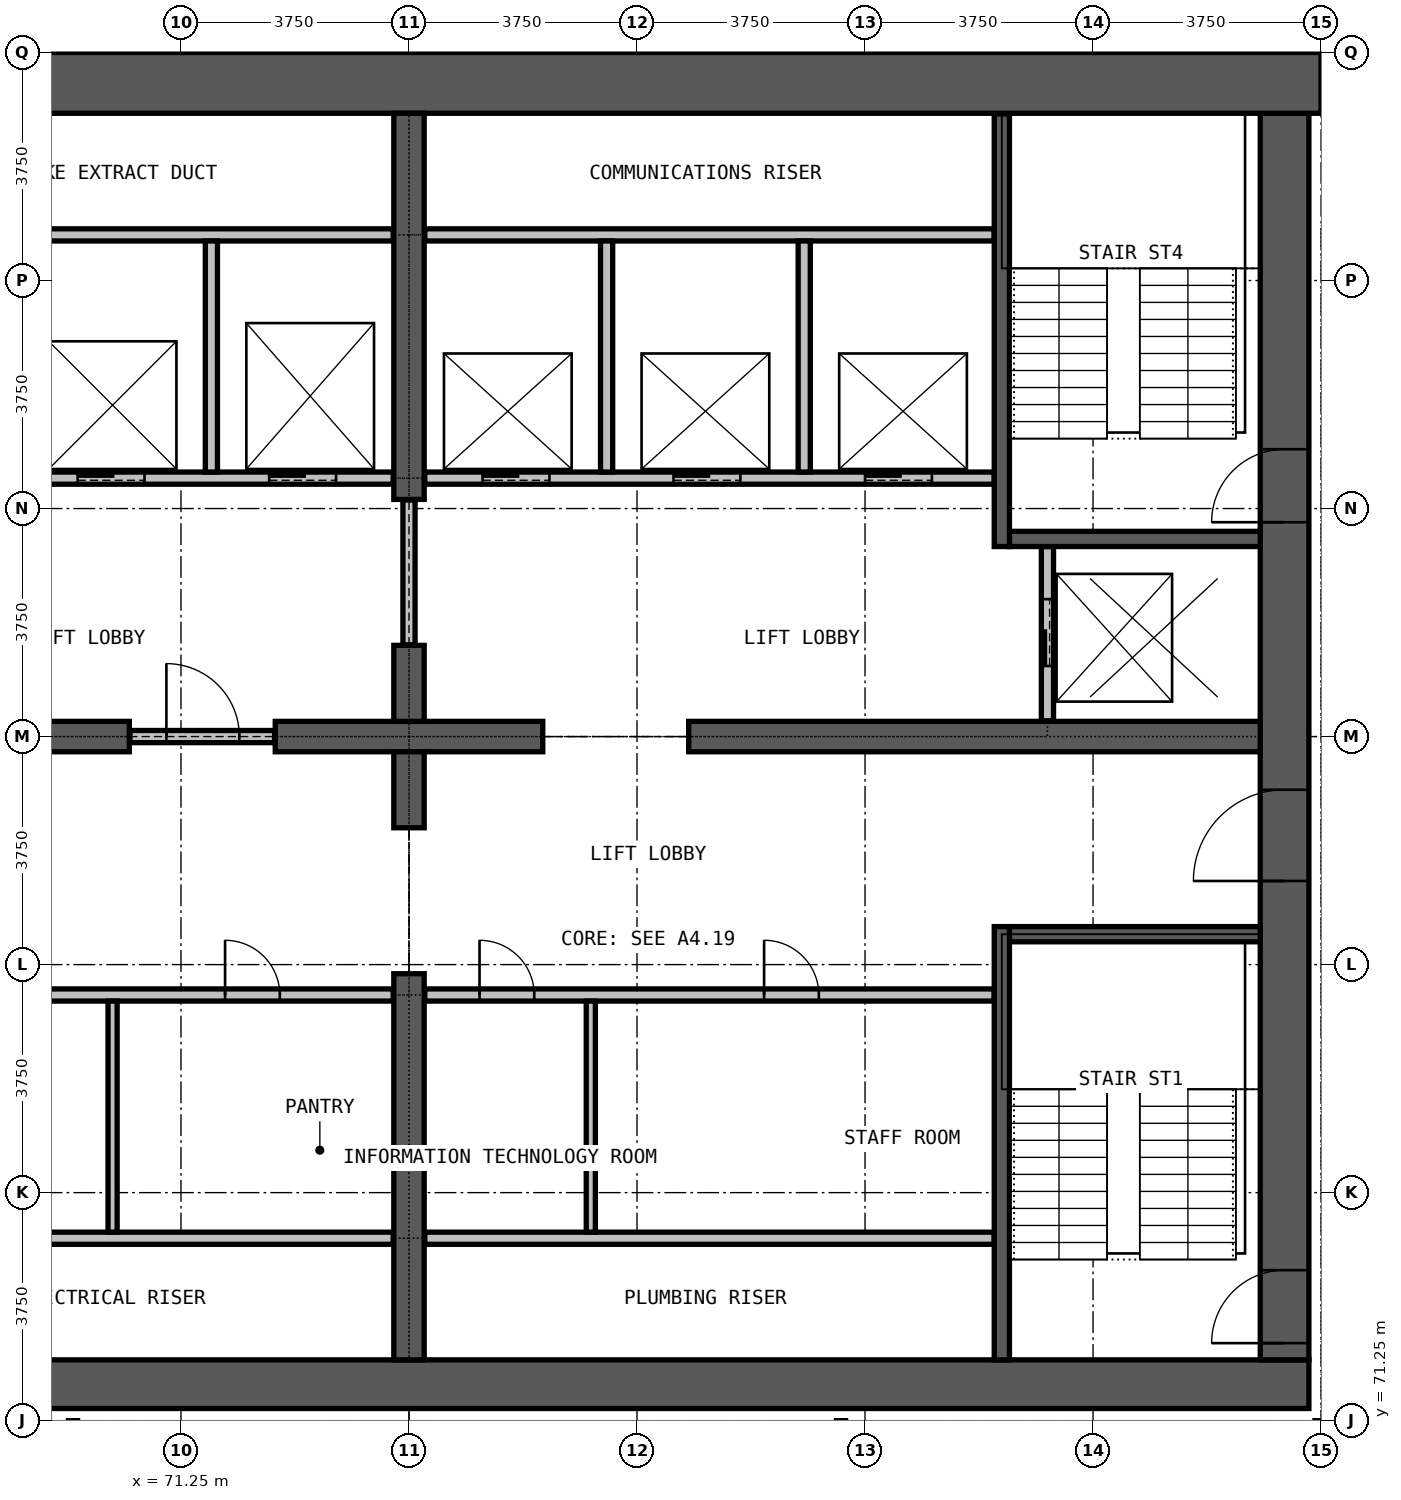
"""IFC4 building model, lengths in metres.
Left out: names, types, materials, properties, quantities, classifications, styles, units other than length and angle.
Written with IfcOpenShell. Run it as: python <this file> out.ifc"""

import sys

from ifc_helpers import new_model, si_unit, direction, frame, frame_2d, origin, place, context, subcontext, project, spatial, rectangle, extrude, element, fill, save


model = new_model("IFC4")
c1 = context("Model", 3, precision=1e-05, world=origin(), true_north=direction((0.0, 1.0)))
c2 = subcontext(c1, "Body", "Model", "MODEL_VIEW")
j1 = project(units=[si_unit("LENGTHUNIT", "METRE"), si_unit("PLANEANGLEUNIT", "RADIAN")], contexts=[c1])
p1 = place(None, origin())
s1 = spatial("IfcSite", under=j1, at=p1, CompositionType="ELEMENT")
p2 = place(p1, origin())
s2 = spatial("IfcBuilding", under=s1, at=p2, CompositionType="ELEMENT")
p3 = place(p2, frame((0.0, 0.0, 180.1)))
s3 = spatial("IfcBuildingStorey", under=s2, at=p3, CompositionType="ELEMENT", Elevation=180.1)
p4 = place(p3, frame((60.2, 71.85, 0.0), z_axis=(0.0, 0.0, 1.0), x_axis=(1.0, 0.0, 0.0)))
e1 = element("IfcWall", 1, at=p4, inside=s3, PredefinedType="SHEAR", context=c2, shape_type="SweptSolid", body=[
    extrude(rectangle(XDim=29.6, YDim=0.8, at=frame_2d((14.8, 0.0))), origin(), (0.0, 0.0, 1.0), 3.6),
])
p5 = place(p3, frame((89.4, 72.25, 0.0), z_axis=(0.0, 0.0, 1.0), x_axis=(0.0, 1.0, 0.0)))
e2 = element("IfcWall", 2, at=p5, inside=s3, PredefinedType="SHEAR", context=c2, shape_type="SweptSolid", body=[
    extrude(rectangle(XDim=20.5, YDim=0.8, at=frame_2d((10.25, 0.0))), origin(), (0.0, 0.0, 1.0), 3.6),
])
p6 = place(p5, frame((0.275, 0.0, 0.0)))
e3 = element("IfcOpeningElement", 3, at=p6, cuts=e2, PredefinedType="OPENING", context=c2, shape_type="SweptSolid", body=[
    extrude(rectangle(XDim=1.2, YDim=2.2, at=frame_2d((0.6, 1.1))), frame((0.0, 0.41, 0.0), z_axis=(0.0, -1.0, 0.0), x_axis=(1.0, 0.0, 0.0)), (0.0, 0.0, 1.0), 0.82),
])
p7 = place(p5, frame((13.775, 0.0, 0.0)))
e4 = element("IfcOpeningElement", 4, at=p7, cuts=e2, PredefinedType="OPENING", context=c2, shape_type="SweptSolid", body=[
    extrude(rectangle(XDim=1.2, YDim=2.2, at=frame_2d((0.6, 1.1))), frame((0.0, 0.41, 0.0), z_axis=(0.0, -1.0, 0.0), x_axis=(1.0, 0.0, 0.0)), (0.0, 0.0, 1.0), 0.82),
])
p8 = place(p5, frame((7.875, 0.0, 0.0)))
e5 = element("IfcOpeningElement", 5, at=p8, cuts=e2, PredefinedType="OPENING", context=c2, shape_type="SweptSolid", body=[
    extrude(rectangle(XDim=1.5, YDim=2.2, at=frame_2d((0.75, 1.1))), frame((0.0, 0.41, 0.0), z_axis=(0.0, -1.0, 0.0), x_axis=(1.0, 0.0, 0.0)), (0.0, 0.0, 1.0), 0.82),
])
p9 = place(p3, frame((90.0, 93.25, 0.0), z_axis=(0.0, 0.0, 1.0), x_axis=(-1.0, 0.0, 0.0)))
e6 = element("IfcWall", 6, at=p9, inside=s3, PredefinedType="SHEAR", context=c2, shape_type="SweptSolid", body=[
    extrude(rectangle(XDim=30.0, YDim=1.0, at=frame_2d((15.0, 0.0))), origin(), (0.0, 0.0, 1.0), 3.6),
])
p10 = place(p3, frame((61.0, 82.5, 0.0), z_axis=(0.0, 0.0, 1.0), x_axis=(1.0, 0.0, 0.0)))
e7 = element("IfcWall", 7, at=p10, inside=s3, PredefinedType="SHEAR", context=c2, shape_type="SweptSolid", body=[
    extrude(rectangle(XDim=9.4, YDim=0.5, at=frame_2d((4.7, 0.0))), origin(), (0.0, 0.0, 1.0), 3.6),
])
p11 = place(p3, frame((72.8, 82.5, 0.0), z_axis=(0.0, 0.0, 1.0), x_axis=(1.0, 0.0, 0.0)))
e8 = element("IfcWall", 8, at=p11, inside=s3, PredefinedType="SHEAR", context=c2, shape_type="SweptSolid", body=[
    extrude(rectangle(XDim=4.4, YDim=0.5, at=frame_2d((2.2, 0.0))), origin(), (0.0, 0.0, 1.0), 3.6),
])
p12 = place(p3, frame((79.6, 82.5, 0.0), z_axis=(0.0, 0.0, 1.0), x_axis=(1.0, 0.0, 0.0)))
e9 = element("IfcWall", 9, at=p12, inside=s3, PredefinedType="SHEAR", context=c2, shape_type="SweptSolid", body=[
    extrude(rectangle(XDim=9.4, YDim=0.5, at=frame_2d((4.7, 0.0))), origin(), (0.0, 0.0, 1.0), 3.6),
])
p13 = place(p3, frame((75.0, 72.25, 0.0), z_axis=(0.0, 0.0, 1.0), x_axis=(0.0, 1.0, 0.0)))
e10 = element("IfcWall", 10, at=p13, inside=s3, PredefinedType="SHEAR", context=c2, shape_type="SweptSolid", body=[
    extrude(rectangle(XDim=6.35, YDim=0.5, at=frame_2d((3.175, 0.0))), origin(), (0.0, 0.0, 1.0), 3.6),
])
for number, where, z_axis, x_axis in (
    (11, (75.0, 81.0, 0.0), (0.0, 0.0, 1.0), (0.0, 1.0, 0.0)),
    (12, (75.0, 82.75, 0.0), (0.0, 0.0, 1.0), (0.0, 1.0, 0.0)),
):
    element("IfcWall", number, at=place(p3, frame(where, z_axis=z_axis, x_axis=x_axis)), inside=s3, PredefinedType="SHEAR", context=c2, shape_type="SweptSolid", body=[
        extrude(rectangle(XDim=1.25, YDim=0.5, at=frame_2d((0.625, 0.0))), origin(), (0.0, 0.0, 1.0), 3.6),
    ])
p14 = place(p3, frame((75.0, 86.4, 0.0), z_axis=(0.0, 0.0, 1.0), x_axis=(0.0, 1.0, 0.0)))
e13 = element("IfcWall", 13, at=p14, inside=s3, PredefinedType="SHEAR", context=c2, shape_type="SweptSolid", body=[
    extrude(rectangle(XDim=6.35, YDim=0.5, at=frame_2d((3.175, 0.0))), origin(), (0.0, 0.0, 1.0), 3.6),
])
for number, where, z_axis, x_axis in (
    (14, (65.375, 74.25, 0.0), (0.0, 0.0, 1.0), (1.0, 0.0, 0.0)),
    (15, (75.26, 74.25, 0.0), (0.0, 0.0, 1.0), (1.0, 0.0, 0.0)),
):
    element("IfcWall", number, at=place(p3, frame(where, z_axis=z_axis, x_axis=x_axis)), inside=s3, PredefinedType="PARTITIONING", context=c2, shape_type="SweptSolid", body=[
        extrude(rectangle(XDim=9.365, YDim=0.2, at=frame_2d((4.683, 0.0))), origin(), (0.0, 0.0, 1.0), 3.25),
    ])
p15 = place(p3, frame((65.375, 78.25, 0.0), z_axis=(0.0, 0.0, 1.0), x_axis=(1.0, 0.0, 0.0)))
e16 = element("IfcWall", 16, at=p15, inside=s3, PredefinedType="PARTITIONING", context=c2, shape_type="SweptSolid", body=[
    extrude(rectangle(XDim=9.365, YDim=0.2, at=frame_2d((4.683, 0.0))), origin(), (0.0, 0.0, 1.0), 3.25),
])
p16 = place(p15, frame((1.9, 0.0, 0.0)))
e17 = element("IfcOpeningElement", 17, at=p16, cuts=e16, PredefinedType="OPENING", context=c2, shape_type="SweptSolid", body=[
    extrude(rectangle(XDim=0.9, YDim=2.2, at=frame_2d((0.45, 1.1))), frame((0.0, 0.11, 0.0), z_axis=(0.0, -1.0, 0.0), x_axis=(1.0, 0.0, 0.0)), (0.0, 0.0, 1.0), 0.22),
])
p17 = place(p15, frame((6.6, 0.0, 0.0)))
e18 = element("IfcOpeningElement", 18, at=p17, cuts=e16, PredefinedType="OPENING", context=c2, shape_type="SweptSolid", body=[
    extrude(rectangle(XDim=0.9, YDim=2.2, at=frame_2d((0.45, 1.1))), frame((0.0, 0.11, 0.0), z_axis=(0.0, -1.0, 0.0), x_axis=(1.0, 0.0, 0.0)), (0.0, 0.0, 1.0), 0.22),
])
p18 = place(p3, frame((75.26, 78.25, 0.0), z_axis=(0.0, 0.0, 1.0), x_axis=(1.0, 0.0, 0.0)))
e19 = element("IfcWall", 19, at=p18, inside=s3, PredefinedType="PARTITIONING", context=c2, shape_type="SweptSolid", body=[
    extrude(rectangle(XDim=9.365, YDim=0.2, at=frame_2d((4.683, 0.0))), origin(), (0.0, 0.0, 1.0), 3.25),
])
p19 = place(p18, frame((0.9, 0.0, 0.0)))
e20 = element("IfcOpeningElement", 20, at=p19, cuts=e19, PredefinedType="OPENING", context=c2, shape_type="SweptSolid", body=[
    extrude(rectangle(XDim=0.9, YDim=2.2, at=frame_2d((0.45, 1.1))), frame((0.0, 0.11, 0.0), z_axis=(0.0, -1.0, 0.0), x_axis=(1.0, 0.0, 0.0)), (0.0, 0.0, 1.0), 0.22),
])
p20 = place(p18, frame((5.58, 0.0, 0.0)))
e21 = element("IfcOpeningElement", 21, at=p20, cuts=e19, PredefinedType="OPENING", context=c2, shape_type="SweptSolid", body=[
    extrude(rectangle(XDim=0.9, YDim=2.2, at=frame_2d((0.45, 1.1))), frame((0.0, 0.11, 0.0), z_axis=(0.0, -1.0, 0.0), x_axis=(1.0, 0.0, 0.0)), (0.0, 0.0, 1.0), 0.22),
])
p21 = place(p3, frame((70.41, 82.5, 0.0), z_axis=(0.0, 0.0, 1.0), x_axis=(1.0, 0.0, 0.0)))
e22 = element("IfcWall", 22, at=p21, inside=s3, PredefinedType="PARTITIONING", context=c2, shape_type="SweptSolid", body=[
    extrude(rectangle(XDim=2.38, YDim=0.2, at=frame_2d((1.19, 0.0))), origin(), (0.0, 0.0, 1.0), 2.4),
])
p22 = place(p21, frame((0.6, 0.0, 0.0)))
e23 = element("IfcOpeningElement", 23, at=p22, cuts=e22, PredefinedType="OPENING", context=c2, shape_type="SweptSolid", body=[
    extrude(rectangle(XDim=1.2, YDim=2.2, at=frame_2d((0.6, 1.1))), frame((0.0, 0.11, 0.0), z_axis=(0.0, -1.0, 0.0), x_axis=(1.0, 0.0, 0.0)), (0.0, 0.0, 1.0), 0.22),
])
p23 = place(p3, frame((75.0, 84.01, 0.0), z_axis=(0.0, 0.0, 1.0), x_axis=(0.0, 1.0, 0.0)))
e24 = element("IfcWall", 24, at=p23, inside=s3, PredefinedType="PARTITIONING", context=c2, shape_type="SweptSolid", body=[
    extrude(rectangle(XDim=2.38, YDim=0.2, at=frame_2d((1.19, 0.0))), origin(), (0.0, 0.0, 1.0), 2.4),
])
for number, where, z_axis, x_axis in (
    (25, (70.125, 74.35, 0.0), (0.0, 0.0, 1.0), (0.0, 1.0, 0.0)),
    (26, (77.99, 74.35, 0.0), (0.0, 0.0, 1.0), (0.0, 1.0, 0.0)),
):
    element("IfcWall", number, at=place(p3, frame(where, z_axis=z_axis, x_axis=x_axis)), inside=s3, PredefinedType="PARTITIONING", context=c2, shape_type="SweptSolid", body=[
        extrude(rectangle(XDim=3.8, YDim=0.15, at=frame_2d((1.9, 0.0))), origin(), (0.0, 0.0, 1.0), 3.25),
    ])
p24 = place(p3, frame((65.375, 86.75, 0.0), z_axis=(0.0, 0.0, 1.0), x_axis=(1.0, 0.0, 0.0)))
e27 = element("IfcWall", 27, at=p24, inside=s3, PredefinedType="PARTITIONING", context=c2, shape_type="SweptSolid", body=[
    extrude(rectangle(XDim=9.365, YDim=0.2, at=frame_2d((4.683, 0.0))), origin(), (0.0, 0.0, 1.0), 3.25),
])
p25 = place(p24, frame((1.0, 0.0, 0.0)))
e28 = element("IfcOpeningElement", 28, at=p25, cuts=e27, PredefinedType="OPENING", context=c2, shape_type="SweptSolid", body=[
    extrude(rectangle(XDim=1.1, YDim=2.2, at=frame_2d((0.55, 1.1))), frame((0.0, 0.11, 0.0), z_axis=(0.0, -1.0, 0.0), x_axis=(1.0, 0.0, 0.0)), (0.0, 0.0, 1.0), 0.22),
])
p26 = place(p24, frame((4.175, 0.0, 0.0)))
e29 = element("IfcOpeningElement", 29, at=p26, cuts=e27, PredefinedType="OPENING", context=c2, shape_type="SweptSolid", body=[
    extrude(rectangle(XDim=1.1, YDim=2.2, at=frame_2d((0.55, 1.1))), frame((0.0, 0.11, 0.0), z_axis=(0.0, -1.0, 0.0), x_axis=(1.0, 0.0, 0.0)), (0.0, 0.0, 1.0), 0.22),
])
p27 = place(p24, frame((7.325, 0.0, 0.0)))
e30 = element("IfcOpeningElement", 30, at=p27, cuts=e27, PredefinedType="OPENING", context=c2, shape_type="SweptSolid", body=[
    extrude(rectangle(XDim=1.1, YDim=2.2, at=frame_2d((0.55, 1.1))), frame((0.0, 0.11, 0.0), z_axis=(0.0, -1.0, 0.0), x_axis=(1.0, 0.0, 0.0)), (0.0, 0.0, 1.0), 0.22),
])
p28 = place(p3, frame((75.26, 86.75, 0.0), z_axis=(0.0, 0.0, 1.0), x_axis=(1.0, 0.0, 0.0)))
e31 = element("IfcWall", 31, at=p28, inside=s3, PredefinedType="PARTITIONING", context=c2, shape_type="SweptSolid", body=[
    extrude(rectangle(XDim=9.365, YDim=0.2, at=frame_2d((4.683, 0.0))), origin(), (0.0, 0.0, 1.0), 3.25),
])
p29 = place(p28, frame((0.95, 0.0, 0.0)))
e32 = element("IfcOpeningElement", 32, at=p29, cuts=e31, PredefinedType="OPENING", context=c2, shape_type="SweptSolid", body=[
    extrude(rectangle(XDim=1.1, YDim=2.2, at=frame_2d((0.55, 1.1))), frame((0.0, 0.11, 0.0), z_axis=(0.0, -1.0, 0.0), x_axis=(1.0, 0.0, 0.0)), (0.0, 0.0, 1.0), 0.22),
])
p30 = place(p28, frame((4.09, 0.0, 0.0)))
e33 = element("IfcOpeningElement", 33, at=p30, cuts=e31, PredefinedType="OPENING", context=c2, shape_type="SweptSolid", body=[
    extrude(rectangle(XDim=1.1, YDim=2.2, at=frame_2d((0.55, 1.1))), frame((0.0, 0.11, 0.0), z_axis=(0.0, -1.0, 0.0), x_axis=(1.0, 0.0, 0.0)), (0.0, 0.0, 1.0), 0.22),
])
p31 = place(p28, frame((7.24, 0.0, 0.0)))
e34 = element("IfcOpeningElement", 34, at=p31, cuts=e31, PredefinedType="OPENING", context=c2, shape_type="SweptSolid", body=[
    extrude(rectangle(XDim=1.1, YDim=2.2, at=frame_2d((0.55, 1.1))), frame((0.0, 0.11, 0.0), z_axis=(0.0, -1.0, 0.0), x_axis=(1.0, 0.0, 0.0)), (0.0, 0.0, 1.0), 0.22),
])
for number, where, z_axis, x_axis in (
    (35, (65.375, 90.75, 0.0), (0.0, 0.0, 1.0), (1.0, 0.0, 0.0)),
    (36, (75.26, 90.75, 0.0), (0.0, 0.0, 1.0), (1.0, 0.0, 0.0)),
):
    element("IfcWall", number, at=place(p3, frame(where, z_axis=z_axis, x_axis=x_axis)), inside=s3, PredefinedType="PARTITIONING", context=c2, shape_type="SweptSolid", body=[
        extrude(rectangle(XDim=9.365, YDim=0.2, at=frame_2d((4.683, 0.0))), origin(), (0.0, 0.0, 1.0), 3.25),
    ])
for number, where, z_axis, x_axis in (
    (37, (71.75, 86.85, 0.0), (0.0, 0.0, 1.0), (0.0, 1.0, 0.0)),
    (38, (78.25, 86.85, 0.0), (0.0, 0.0, 1.0), (0.0, 1.0, 0.0)),
    (39, (81.5, 86.85, 0.0), (0.0, 0.0, 1.0), (0.0, 1.0, 0.0)),
):
    element("IfcWall", number, at=place(p3, frame(where, z_axis=z_axis, x_axis=x_axis)), inside=s3, PredefinedType="PARTITIONING", context=c2, shape_type="SweptSolid", body=[
        extrude(rectangle(XDim=3.8, YDim=0.2, at=frame_2d((1.9, 0.0))), origin(), (0.0, 0.0, 1.0), 3.25),
    ])
p32 = place(p3, frame((85.5, 82.76, 0.0), z_axis=(0.0, 0.0, 1.0), x_axis=(0.0, 1.0, 0.0)))
e40 = element("IfcWall", 40, at=p32, inside=s3, PredefinedType="PARTITIONING", context=c2, shape_type="SweptSolid", body=[
    extrude(rectangle(XDim=2.865, YDim=0.2, at=frame_2d((1.433, 0.0))), origin(), (0.0, 0.0, 1.0), 3.25),
])
p33 = place(p32, frame((0.9, 0.0, 0.0)))
e41 = element("IfcOpeningElement", 41, at=p33, cuts=e40, PredefinedType="OPENING", context=c2, shape_type="SweptSolid", body=[
    extrude(rectangle(XDim=1.1, YDim=2.2, at=frame_2d((0.55, 1.1))), frame((0.0, 0.11, 0.0), z_axis=(0.0, -1.0, 0.0), x_axis=(1.0, 0.0, 0.0)), (0.0, 0.0, 1.0), 0.22),
])
for number, where, z_axis, x_axis in (
    (42, (84.875, 79.25, 0.0), (0.0, 0.0, 1.0), (1.0, 0.0, 0.0)),
    (43, (84.875, 85.75, 0.0), (0.0, 0.0, 1.0), (1.0, 0.0, 0.0)),
):
    element("IfcWall", number, at=place(p3, frame(where, z_axis=z_axis, x_axis=x_axis)), inside=s3, PredefinedType="PARTITIONING", context=c2, shape_type="SweptSolid", body=[
        extrude(rectangle(XDim=4.125, YDim=0.25, at=frame_2d((2.062, 0.0))), origin(), (0.0, 0.0, 1.0), 3.25),
    ])
p34 = place(p3, frame((84.75, 72.25, 0.0), z_axis=(0.0, 0.0, 1.0), x_axis=(0.0, 1.0, 0.0)))
e44 = element("IfcWall", 44, at=p34, inside=s3, PredefinedType="PARTITIONING", context=c2, shape_type="SweptSolid", body=[
    extrude(rectangle(XDim=7.125, YDim=0.25, at=frame_2d((3.562, 0.0))), origin(), (0.0, 0.0, 1.0), 3.25),
])
p35 = place(p3, frame((84.75, 85.625, 0.0), z_axis=(0.0, 0.0, 1.0), x_axis=(0.0, 1.0, 0.0)))
e45 = element("IfcWall", 45, at=p35, inside=s3, PredefinedType="PARTITIONING", context=c2, shape_type="SweptSolid", body=[
    extrude(rectangle(XDim=7.115, YDim=0.25, at=frame_2d((3.558, 0.0))), origin(), (0.0, 0.0, 1.0), 3.25),
])
p36 = place(p29, origin())
e46 = element("IfcDoor", 46, at=p36, inside=s3, OperationType="DOUBLE_DOOR_SLIDING", PredefinedType="DOOR", context=c2, shape_type="SweptSolid", body=[
    extrude(rectangle(XDim=1.1, YDim=2.2, at=frame_2d((0.55, 1.1))), frame((0.0, 0.025, 0.0), z_axis=(0.0, -1.0, 0.0), x_axis=(1.0, 0.0, 0.0)), (0.0, 0.0, 1.0), 0.05),
])
fill(e32, e46)
p37 = place(p30, origin())
e47 = element("IfcDoor", 47, at=p37, inside=s3, OperationType="DOUBLE_DOOR_SLIDING", PredefinedType="DOOR", context=c2, shape_type="SweptSolid", body=[
    extrude(rectangle(XDim=1.1, YDim=2.2, at=frame_2d((0.55, 1.1))), frame((0.0, 0.025, 0.0), z_axis=(0.0, -1.0, 0.0), x_axis=(1.0, 0.0, 0.0)), (0.0, 0.0, 1.0), 0.05),
])
fill(e33, e47)
p38 = place(p31, origin())
e48 = element("IfcDoor", 48, at=p38, inside=s3, OperationType="DOUBLE_DOOR_SLIDING", PredefinedType="DOOR", context=c2, shape_type="SweptSolid", body=[
    extrude(rectangle(XDim=1.1, YDim=2.2, at=frame_2d((0.55, 1.1))), frame((0.0, 0.025, 0.0), z_axis=(0.0, -1.0, 0.0), x_axis=(1.0, 0.0, 0.0)), (0.0, 0.0, 1.0), 0.05),
])
fill(e34, e48)
p39 = place(p26, origin())
e49 = element("IfcDoor", 49, at=p39, inside=s3, OperationType="DOUBLE_DOOR_SLIDING", PredefinedType="DOOR", context=c2, shape_type="SweptSolid", body=[
    extrude(rectangle(XDim=1.1, YDim=2.2, at=frame_2d((0.55, 1.1))), frame((0.0, 0.025, 0.0), z_axis=(0.0, -1.0, 0.0), x_axis=(1.0, 0.0, 0.0)), (0.0, 0.0, 1.0), 0.05),
])
fill(e29, e49)
p40 = place(p27, origin())
e50 = element("IfcDoor", 50, at=p40, inside=s3, OperationType="DOUBLE_DOOR_SLIDING", PredefinedType="DOOR", context=c2, shape_type="SweptSolid", body=[
    extrude(rectangle(XDim=1.1, YDim=2.2, at=frame_2d((0.55, 1.1))), frame((0.0, 0.025, 0.0), z_axis=(0.0, -1.0, 0.0), x_axis=(1.0, 0.0, 0.0)), (0.0, 0.0, 1.0), 0.05),
])
fill(e30, e50)
p41 = place(p33, origin())
e51 = element("IfcDoor", 51, at=p41, inside=s3, OperationType="DOUBLE_DOOR_SLIDING", PredefinedType="DOOR", context=c2, shape_type="SweptSolid", body=[
    extrude(rectangle(XDim=1.1, YDim=2.2, at=frame_2d((0.55, 1.1))), frame((0.0, 0.025, 0.0), z_axis=(0.0, -1.0, 0.0), x_axis=(1.0, 0.0, 0.0)), (0.0, 0.0, 1.0), 0.05),
])
fill(e41, e51)
p42 = place(p22, origin())
e52 = element("IfcDoor", 52, at=p42, inside=s3, OperationType="SINGLE_SWING_LEFT", PredefinedType="DOOR", context=c2, shape_type="SweptSolid", body=[
    extrude(rectangle(XDim=1.2, YDim=2.2, at=frame_2d((0.6, 1.1))), frame((0.0, 0.025, 0.0), z_axis=(0.0, -1.0, 0.0), x_axis=(1.0, 0.0, 0.0)), (0.0, 0.0, 1.0), 0.05),
])
fill(e23, e52)
p43 = place(p6, origin())
e53 = element("IfcDoor", 53, at=p43, inside=s3, OperationType="SINGLE_SWING_RIGHT", PredefinedType="DOOR", context=c2, shape_type="SweptSolid", body=[
    extrude(rectangle(XDim=1.2, YDim=2.2, at=frame_2d((0.6, 1.1))), frame((0.0, 0.025, 0.0), z_axis=(0.0, -1.0, 0.0), x_axis=(1.0, 0.0, 0.0)), (0.0, 0.0, 1.0), 0.05),
])
fill(e3, e53)
p44 = place(p7, origin())
e54 = element("IfcDoor", 54, at=p44, inside=s3, OperationType="SINGLE_SWING_RIGHT", PredefinedType="DOOR", context=c2, shape_type="SweptSolid", body=[
    extrude(rectangle(XDim=1.2, YDim=2.2, at=frame_2d((0.6, 1.1))), frame((0.0, 0.025, 0.0), z_axis=(0.0, -1.0, 0.0), x_axis=(1.0, 0.0, 0.0)), (0.0, 0.0, 1.0), 0.05),
])
fill(e4, e54)
p45 = place(p8, origin())
e55 = element("IfcDoor", 55, at=p45, inside=s3, OperationType="DOUBLE_DOOR_SINGLE_SWING", PredefinedType="DOOR", context=c2, shape_type="SweptSolid", body=[
    extrude(rectangle(XDim=1.5, YDim=2.2, at=frame_2d((0.75, 1.1))), frame((0.0, 0.025, 0.0), z_axis=(0.0, -1.0, 0.0), x_axis=(1.0, 0.0, 0.0)), (0.0, 0.0, 1.0), 0.05),
])
fill(e5, e55)
p46 = place(p17, origin())
e56 = element("IfcDoor", 56, at=p46, inside=s3, OperationType="SINGLE_SWING_LEFT", PredefinedType="DOOR", context=c2, shape_type="SweptSolid", body=[
    extrude(rectangle(XDim=0.9, YDim=2.2, at=frame_2d((0.45, 1.1))), frame((0.0, 0.025, 0.0), z_axis=(0.0, -1.0, 0.0), x_axis=(1.0, 0.0, 0.0)), (0.0, 0.0, 1.0), 0.05),
])
fill(e18, e56)
p47 = place(p19, origin())
e57 = element("IfcDoor", 57, at=p47, inside=s3, OperationType="SINGLE_SWING_LEFT", PredefinedType="DOOR", context=c2, shape_type="SweptSolid", body=[
    extrude(rectangle(XDim=0.9, YDim=2.2, at=frame_2d((0.45, 1.1))), frame((0.0, 0.025, 0.0), z_axis=(0.0, -1.0, 0.0), x_axis=(1.0, 0.0, 0.0)), (0.0, 0.0, 1.0), 0.05),
])
fill(e20, e57)
p48 = place(p20, origin())
e58 = element("IfcDoor", 58, at=p48, inside=s3, OperationType="SINGLE_SWING_LEFT", PredefinedType="DOOR", context=c2, shape_type="SweptSolid", body=[
    extrude(rectangle(XDim=0.9, YDim=2.2, at=frame_2d((0.45, 1.1))), frame((0.0, 0.025, 0.0), z_axis=(0.0, -1.0, 0.0), x_axis=(1.0, 0.0, 0.0)), (0.0, 0.0, 1.0), 0.05),
])
fill(e21, e58)
save(model, sys.argv[1])
